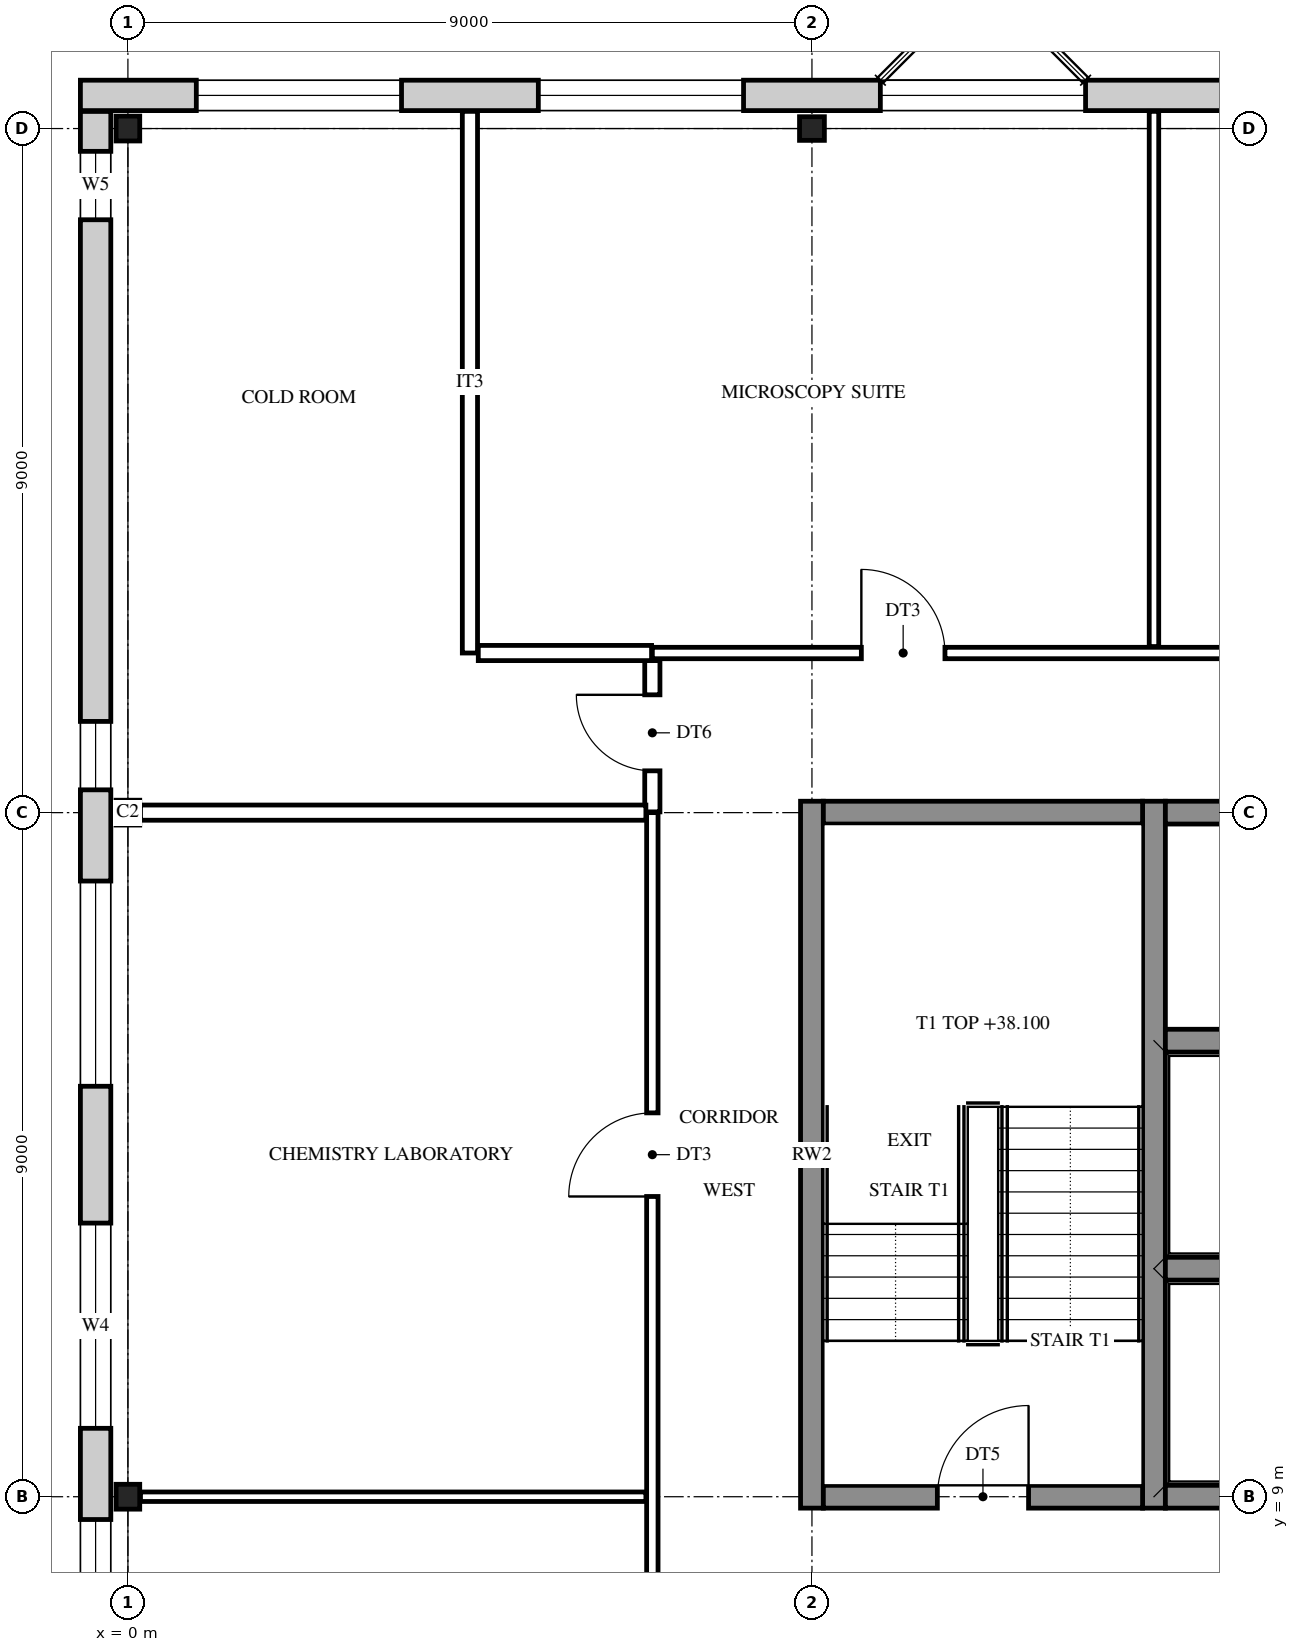
"""IFC4 building model, lengths in metres.
Left out: names, types, materials, properties, quantities, classifications, styles, units other than length and angle.
Written with IfcOpenShell. Run it as: python <this file> out.ifc"""

import sys

from ifc_helpers import new_model, si_unit, direction, frame, frame_2d, origin, origin_2d, place, context, subcontext, project, spatial, rectangle, i_section, extrude, element, fill, save


model = new_model("IFC4")
c1 = context("Model", 3, precision=1e-05, world=origin(), true_north=direction((0.0, 1.0)))
c2 = subcontext(c1, "Body", "Model", "MODEL_VIEW")
j1 = project(units=[si_unit("LENGTHUNIT", "METRE"), si_unit("PLANEANGLEUNIT", "RADIAN")], contexts=[c1])
p1 = place(None, origin())
s1 = spatial("IfcSite", under=j1, at=p1, CompositionType="ELEMENT")
p2 = place(p1, origin())
s2 = spatial("IfcBuilding", under=s1, at=p2, CompositionType="ELEMENT")
p3 = place(p2, frame((0.0, 0.0, 36.0)))
s3 = spatial("IfcBuildingStorey", under=s2, at=p3, CompositionType="ELEMENT", Elevation=36.0)
for number, where, z_axis, x_axis in (
    (1, (0.0, 9.0, 0.0), (0.0, 0.0, 1.0), (1.0, 0.0, 0.0)),
    (2, (0.0, 18.0, 0.0), (0.0, 0.0, 1.0), (1.0, 0.0, 0.0)),
    (3, (0.0, 27.0, 0.0), (0.0, 0.0, 1.0), (1.0, 0.0, 0.0)),
    (4, (9.0, 27.0, 0.0), (0.0, 0.0, 1.0), (0.0, 1.0, 0.0)),
):
    element("IfcColumn", number, at=place(p3, frame(where, z_axis=z_axis, x_axis=x_axis)), inside=s3, PredefinedType="COLUMN", context=c2, shape_type="SweptSolid", body=[
        extrude(i_section(OverallWidth=0.311, OverallDepth=0.327, WebThickness=0.016, FlangeThickness=0.025, FilletRadius=0.017, at=origin_2d()), origin(), (0.0, 0.0, 1.0), 4.2),
    ])
for number, where, z_axis, x_axis in (
    (5, (9.0, 8.85, 0.0), (0.0, 0.0, 1.0), (0.0, 1.0, 0.0)),
    (6, (13.5, 8.85, 0.0), (0.0, 0.0, 1.0), (0.0, 1.0, 0.0)),
):
    element("IfcWall", number, at=place(p3, frame(where, z_axis=z_axis, x_axis=x_axis)), inside=s3, PredefinedType="SHEAR", context=c2, shape_type="SweptSolid", body=[
        extrude(rectangle(XDim=9.3, YDim=0.3, at=frame_2d((4.65, 0.0))), origin(), (0.0, 0.0, 1.0), 4.2),
    ])
p4 = place(p3, frame((9.15, 9.0, 0.0), z_axis=(0.0, 0.0, 1.0), x_axis=(1.0, 0.0, 0.0)))
e7 = element("IfcWall", 7, at=p4, inside=s3, PredefinedType="SHEAR", context=c2, shape_type="SweptSolid", body=[
    extrude(rectangle(XDim=4.2, YDim=0.3, at=frame_2d((2.1, 0.0))), origin(), (0.0, 0.0, 1.0), 4.2),
])
p5 = place(p4, frame((1.5, 0.0, 0.0)))
e8 = element("IfcOpeningElement", 8, at=p5, cuts=e7, PredefinedType="OPENING", context=c2, shape_type="SweptSolid", body=[
    extrude(rectangle(XDim=1.2, YDim=2.1, at=frame_2d((0.6, 1.05))), frame((0.0, 0.16, 0.0), z_axis=(0.0, -1.0, 0.0), x_axis=(1.0, 0.0, 0.0)), (0.0, 0.0, 1.0), 0.32),
])
for number, where, z_axis, x_axis in (
    (9, (13.65, 9.0, 0.0), (0.0, 0.0, 1.0), (1.0, 0.0, 0.0)),
    (10, (13.65, 12.0, 0.0), (0.0, 0.0, 1.0), (1.0, 0.0, 0.0)),
    (11, (13.65, 15.0, 0.0), (0.0, 0.0, 1.0), (1.0, 0.0, 0.0)),
):
    element("IfcWall", number, at=place(p3, frame(where, z_axis=z_axis, x_axis=x_axis)), inside=s3, PredefinedType="SHEAR", context=c2, shape_type="SweptSolid", body=[
        extrude(rectangle(XDim=2.7, YDim=0.3, at=frame_2d((1.35, 0.0))), origin(), (0.0, 0.0, 1.0), 4.2),
    ])
p6 = place(p3, frame((9.15, 18.0, 0.0), z_axis=(0.0, 0.0, 1.0), x_axis=(1.0, 0.0, 0.0)))
e12 = element("IfcWall", 12, at=p6, inside=s3, PredefinedType="SHEAR", context=c2, shape_type="SweptSolid", body=[
    extrude(rectangle(XDim=4.2, YDim=0.3, at=frame_2d((2.1, 0.0))), origin(), (0.0, 0.0, 1.0), 4.2),
])
p7 = place(p3, frame((13.65, 18.0, 0.0), z_axis=(0.0, 0.0, 1.0), x_axis=(1.0, 0.0, 0.0)))
e13 = element("IfcWall", 13, at=p7, inside=s3, PredefinedType="SHEAR", context=c2, shape_type="SweptSolid", body=[
    extrude(rectangle(XDim=2.7, YDim=0.3, at=frame_2d((1.35, 0.0))), origin(), (0.0, 0.0, 1.0), 4.2),
])
p8 = place(p3, frame((-0.425, -0.225, 0.0), z_axis=(0.0, 0.0, 1.0), x_axis=(0.0, 1.0, 0.0)))
e14 = element("IfcWall", 14, at=p8, inside=s3, PredefinedType="STANDARD", context=c2, shape_type="SweptSolid", body=[
    extrude(rectangle(XDim=27.45, YDim=0.4, at=frame_2d((13.725, 0.0))), origin(), (0.0, 0.0, 1.0), 4.2),
])
p9 = place(p8, frame((0.525, 0.0, 0.9)))
e15 = element("IfcOpeningElement", 15, at=p9, cuts=e14, PredefinedType="OPENING", context=c2, shape_type="SweptSolid", body=[
    extrude(rectangle(XDim=0.9, YDim=2.0, at=frame_2d((0.45, 1.0))), frame((0.0, 0.21, 0.0), z_axis=(0.0, -1.0, 0.0), x_axis=(1.0, 0.0, 0.0)), (0.0, 0.0, 1.0), 0.42),
])
p10 = place(p8, frame((8.025, 0.0, 0.9)))
e16 = element("IfcOpeningElement", 16, at=p10, cuts=e14, PredefinedType="OPENING", context=c2, shape_type="SweptSolid", body=[
    extrude(rectangle(XDim=0.9, YDim=2.0, at=frame_2d((0.45, 1.0))), frame((0.0, 0.21, 0.0), z_axis=(0.0, -1.0, 0.0), x_axis=(1.0, 0.0, 0.0)), (0.0, 0.0, 1.0), 0.42),
])
p11 = place(p8, frame((10.125, 0.0, 0.9)))
e17 = element("IfcOpeningElement", 17, at=p11, cuts=e14, PredefinedType="OPENING", context=c2, shape_type="SweptSolid", body=[
    extrude(rectangle(XDim=2.7, YDim=2.5, at=frame_2d((1.35, 1.25))), frame((0.0, 0.21, 0.0), z_axis=(0.0, -1.0, 0.0), x_axis=(1.0, 0.0, 0.0)), (0.0, 0.0, 1.0), 0.42),
])
p12 = place(p8, frame((14.625, 0.0, 0.9)))
e18 = element("IfcOpeningElement", 18, at=p12, cuts=e14, PredefinedType="OPENING", context=c2, shape_type="SweptSolid", body=[
    extrude(rectangle(XDim=2.7, YDim=2.5, at=frame_2d((1.35, 1.25))), frame((0.0, 0.21, 0.0), z_axis=(0.0, -1.0, 0.0), x_axis=(1.0, 0.0, 0.0)), (0.0, 0.0, 1.0), 0.42),
])
p13 = place(p8, frame((18.525, 0.0, 0.9)))
e19 = element("IfcOpeningElement", 19, at=p13, cuts=e14, PredefinedType="OPENING", context=c2, shape_type="SweptSolid", body=[
    extrude(rectangle(XDim=0.9, YDim=2.0, at=frame_2d((0.45, 1.0))), frame((0.0, 0.21, 0.0), z_axis=(0.0, -1.0, 0.0), x_axis=(1.0, 0.0, 0.0)), (0.0, 0.0, 1.0), 0.42),
])
p14 = place(p8, frame((26.025, 0.0, 0.9)))
e20 = element("IfcOpeningElement", 20, at=p14, cuts=e14, PredefinedType="OPENING", context=c2, shape_type="SweptSolid", body=[
    extrude(rectangle(XDim=0.9, YDim=2.0, at=frame_2d((0.45, 1.0))), frame((0.0, 0.21, 0.0), z_axis=(0.0, -1.0, 0.0), x_axis=(1.0, 0.0, 0.0)), (0.0, 0.0, 1.0), 0.42),
])
p15 = place(p3, frame((-0.625, 27.436, 0.0), z_axis=(0.0, 0.0, 1.0), x_axis=(1.0, 0.0, 0.0)))
e21 = element("IfcWall", 21, at=p15, inside=s3, PredefinedType="STANDARD", context=c2, shape_type="SweptSolid", body=[
    extrude(rectangle(XDim=32.75, YDim=0.4, at=frame_2d((16.375, 0.0))), origin(), (0.0, 0.0, 1.0), 4.2),
])
p16 = place(p15, frame((1.525, 0.0, 0.9)))
e22 = element("IfcOpeningElement", 22, at=p16, cuts=e21, PredefinedType="OPENING", context=c2, shape_type="SweptSolid", body=[
    extrude(rectangle(XDim=2.7, YDim=2.5, at=frame_2d((1.35, 1.25))), frame((0.0, 0.21, 0.0), z_axis=(0.0, -1.0, 0.0), x_axis=(1.0, 0.0, 0.0)), (0.0, 0.0, 1.0), 0.42),
])
p17 = place(p15, frame((6.025, 0.0, 0.9)))
e23 = element("IfcOpeningElement", 23, at=p17, cuts=e21, PredefinedType="OPENING", context=c2, shape_type="SweptSolid", body=[
    extrude(rectangle(XDim=2.7, YDim=2.5, at=frame_2d((1.35, 1.25))), frame((0.0, 0.21, 0.0), z_axis=(0.0, -1.0, 0.0), x_axis=(1.0, 0.0, 0.0)), (0.0, 0.0, 1.0), 0.42),
])
p18 = place(p15, frame((10.525, 0.0, 0.9)))
e24 = element("IfcOpeningElement", 24, at=p18, cuts=e21, PredefinedType="OPENING", context=c2, shape_type="SweptSolid", body=[
    extrude(rectangle(XDim=2.7, YDim=2.5, at=frame_2d((1.35, 1.25))), frame((0.0, 0.21, 0.0), z_axis=(0.0, -1.0, 0.0), x_axis=(1.0, 0.0, 0.0)), (0.0, 0.0, 1.0), 0.42),
])
p19 = place(p15, frame((15.025, 0.0, 0.9)))
e25 = element("IfcOpeningElement", 25, at=p19, cuts=e21, PredefinedType="OPENING", context=c2, shape_type="SweptSolid", body=[
    extrude(rectangle(XDim=2.7, YDim=2.5, at=frame_2d((1.35, 1.25))), frame((0.0, 0.21, 0.0), z_axis=(0.0, -1.0, 0.0), x_axis=(1.0, 0.0, 0.0)), (0.0, 0.0, 1.0), 0.42),
])
p20 = place(p15, frame((19.525, 0.0, 0.9)))
e26 = element("IfcOpeningElement", 26, at=p20, cuts=e21, PredefinedType="OPENING", context=c2, shape_type="SweptSolid", body=[
    extrude(rectangle(XDim=2.7, YDim=2.5, at=frame_2d((1.35, 1.25))), frame((0.0, 0.21, 0.0), z_axis=(0.0, -1.0, 0.0), x_axis=(1.0, 0.0, 0.0)), (0.0, 0.0, 1.0), 0.42),
])
p21 = place(p15, frame((24.025, 0.0, 0.9)))
e27 = element("IfcOpeningElement", 27, at=p21, cuts=e21, PredefinedType="OPENING", context=c2, shape_type="SweptSolid", body=[
    extrude(rectangle(XDim=2.7, YDim=2.5, at=frame_2d((1.35, 1.25))), frame((0.0, 0.21, 0.0), z_axis=(0.0, -1.0, 0.0), x_axis=(1.0, 0.0, 0.0)), (0.0, 0.0, 1.0), 0.42),
])
p22 = place(p15, frame((28.525, 0.0, 0.9)))
e28 = element("IfcOpeningElement", 28, at=p22, cuts=e21, PredefinedType="OPENING", context=c2, shape_type="SweptSolid", body=[
    extrude(rectangle(XDim=2.7, YDim=2.5, at=frame_2d((1.35, 1.25))), frame((0.0, 0.21, 0.0), z_axis=(0.0, -1.0, 0.0), x_axis=(1.0, 0.0, 0.0)), (0.0, 0.0, 1.0), 0.42),
])
p23 = place(p3, frame((4.5, 20.1, 0.0), z_axis=(0.0, 0.0, 1.0), x_axis=(0.0, 1.0, 0.0)))
e29 = element("IfcWall", 29, at=p23, inside=s3, PredefinedType="PARTITIONING", context=c2, shape_type="SweptSolid", body=[
    extrude(rectangle(XDim=7.126, YDim=0.2, at=frame_2d((3.563, 0.0))), origin(), (0.0, 0.0, 1.0), 3.537),
])
p24 = place(p3, frame((6.9, 6.985, 0.0), z_axis=(0.0, 0.0, 1.0), x_axis=(0.0, 1.0, 0.0)))
e30 = element("IfcWall", 30, at=p24, inside=s3, PredefinedType="PARTITIONING", context=c2, shape_type="SweptSolid", body=[
    extrude(rectangle(XDim=11.015, YDim=0.15, at=frame_2d((5.507, 0.0))), origin(), (0.0, 0.0, 1.0), 3.537),
])
p25 = place(p24, frame((5.965, 0.0, 0.0)))
e31 = element("IfcOpeningElement", 31, at=p25, cuts=e30, PredefinedType="OPENING", context=c2, shape_type="SweptSolid", body=[
    extrude(rectangle(XDim=1.1, YDim=2.1, at=frame_2d((0.55, 1.05))), frame((0.0, 0.085, 0.0), z_axis=(0.0, -1.0, 0.0), x_axis=(1.0, 0.0, 0.0)), (0.0, 0.0, 1.0), 0.17),
])
p26 = place(p3, frame((6.9, 18.01, 0.0), z_axis=(0.0, 0.0, 1.0), x_axis=(0.0, 1.0, 0.0)))
e32 = element("IfcWall", 32, at=p26, inside=s3, PredefinedType="PARTITIONING", context=c2, shape_type="SweptSolid", body=[
    extrude(rectangle(XDim=1.99, YDim=0.2, at=frame_2d((0.995, 0.0))), origin(), (0.0, 0.0, 1.0), 3.537),
])
p27 = place(p26, frame((0.54, 0.0, 0.0)))
e33 = element("IfcOpeningElement", 33, at=p27, cuts=e32, PredefinedType="OPENING", context=c2, shape_type="SweptSolid", body=[
    extrude(rectangle(XDim=1.0, YDim=2.1, at=frame_2d((0.5, 1.05))), frame((0.0, 0.11, 0.0), z_axis=(0.0, -1.0, 0.0), x_axis=(1.0, 0.0, 0.0)), (0.0, 0.0, 1.0), 0.22),
])
p28 = place(p3, frame((13.5, 20.185, 0.0), z_axis=(0.0, 0.0, 1.0), x_axis=(0.0, 1.0, 0.0)))
e34 = element("IfcWall", 34, at=p28, inside=s3, PredefinedType="PARTITIONING", context=c2, shape_type="SweptSolid", body=[
    extrude(rectangle(XDim=7.041, YDim=0.125, at=frame_2d((3.521, 0.0))), origin(), (0.0, 0.0, 1.0), 3.537),
])
p29 = place(p3, frame((0.166, 9.0, 0.0), z_axis=(0.0, 0.0, 1.0), x_axis=(1.0, 0.0, 0.0)))
e35 = element("IfcWall", 35, at=p29, inside=s3, PredefinedType="PARTITIONING", context=c2, shape_type="SweptSolid", body=[
    extrude(rectangle(XDim=6.649, YDim=0.125, at=frame_2d((3.325, 0.0))), origin(), (0.0, 0.0, 1.0), 3.537),
])
p30 = place(p3, frame((0.166, 18.0, 0.0), z_axis=(0.0, 0.0, 1.0), x_axis=(1.0, 0.0, 0.0)))
e36 = element("IfcWall", 36, at=p30, inside=s3, PredefinedType="PARTITIONING", context=c2, shape_type="SweptSolid", body=[
    extrude(rectangle(XDim=6.649, YDim=0.2, at=frame_2d((3.325, 0.0))), origin(), (0.0, 0.0, 1.0), 3.537),
])
p31 = place(p3, frame((4.61, 20.1, 0.0), z_axis=(0.0, 0.0, 1.0), x_axis=(1.0, 0.0, 0.0)))
e37 = element("IfcWall", 37, at=p31, inside=s3, PredefinedType="PARTITIONING", context=c2, shape_type="SweptSolid", body=[
    extrude(rectangle(XDim=2.28, YDim=0.2, at=frame_2d((1.14, 0.0))), origin(), (0.0, 0.0, 1.0), 3.537),
])
p32 = place(p3, frame((6.9, 20.1, 0.0), z_axis=(0.0, 0.0, 1.0), x_axis=(1.0, 0.0, 0.0)))
e38 = element("IfcWall", 38, at=p32, inside=s3, PredefinedType="PARTITIONING", context=c2, shape_type="SweptSolid", body=[
    extrude(rectangle(XDim=15.6, YDim=0.15, at=frame_2d((7.8, 0.0))), origin(), (0.0, 0.0, 1.0), 3.537),
])
p33 = place(p32, frame((2.75, 0.0, 0.0)))
e39 = element("IfcOpeningElement", 39, at=p33, cuts=e38, PredefinedType="OPENING", context=c2, shape_type="SweptSolid", body=[
    extrude(rectangle(XDim=1.1, YDim=2.1, at=frame_2d((0.55, 1.05))), frame((0.0, 0.085, 0.0), z_axis=(0.0, -1.0, 0.0), x_axis=(1.0, 0.0, 0.0)), (0.0, 0.0, 1.0), 0.17),
])
p34 = place(p32, frame((8.35, 0.0, 0.0)))
e40 = element("IfcOpeningElement", 40, at=p34, cuts=e38, PredefinedType="OPENING", context=c2, shape_type="SweptSolid", body=[
    extrude(rectangle(XDim=1.0, YDim=2.1, at=frame_2d((0.5, 1.05))), frame((0.0, 0.085, 0.0), z_axis=(0.0, -1.0, 0.0), x_axis=(1.0, 0.0, 0.0)), (0.0, 0.0, 1.0), 0.17),
])
p35 = place(p32, frame((12.85, 0.0, 0.0)))
e41 = element("IfcOpeningElement", 41, at=p35, cuts=e38, PredefinedType="OPENING", context=c2, shape_type="SweptSolid", body=[
    extrude(rectangle(XDim=1.0, YDim=2.1, at=frame_2d((0.5, 1.05))), frame((0.0, 0.085, 0.0), z_axis=(0.0, -1.0, 0.0), x_axis=(1.0, 0.0, 0.0)), (0.0, 0.0, 1.0), 0.17),
])
p36 = place(p10, origin())
e42 = element("IfcWindow", 42, at=p36, inside=s3, PartitioningType="SINGLE_PANEL", PredefinedType="WINDOW", context=c2, shape_type="SweptSolid", body=[
    extrude(rectangle(XDim=0.9, YDim=2.0, at=frame_2d((0.45, 1.0))), frame((0.0, 0.03, 0.0), z_axis=(0.0, -1.0, 0.0), x_axis=(1.0, 0.0, 0.0)), (0.0, 0.0, 1.0), 0.06),
])
fill(e16, e42)
p37 = place(p11, origin())
e43 = element("IfcWindow", 43, at=p37, inside=s3, PartitioningType="SINGLE_PANEL", PredefinedType="WINDOW", context=c2, shape_type="SweptSolid", body=[
    extrude(rectangle(XDim=2.7, YDim=2.5, at=frame_2d((1.35, 1.25))), frame((0.0, 0.03, 0.0), z_axis=(0.0, -1.0, 0.0), x_axis=(1.0, 0.0, 0.0)), (0.0, 0.0, 1.0), 0.06),
])
fill(e17, e43)
p38 = place(p12, origin())
e44 = element("IfcWindow", 44, at=p38, inside=s3, PartitioningType="SINGLE_PANEL", PredefinedType="WINDOW", context=c2, shape_type="SweptSolid", body=[
    extrude(rectangle(XDim=2.7, YDim=2.5, at=frame_2d((1.35, 1.25))), frame((0.0, 0.03, 0.0), z_axis=(0.0, -1.0, 0.0), x_axis=(1.0, 0.0, 0.0)), (0.0, 0.0, 1.0), 0.06),
])
fill(e18, e44)
p39 = place(p13, origin())
e45 = element("IfcWindow", 45, at=p39, inside=s3, PartitioningType="SINGLE_PANEL", PredefinedType="WINDOW", context=c2, shape_type="SweptSolid", body=[
    extrude(rectangle(XDim=0.9, YDim=2.0, at=frame_2d((0.45, 1.0))), frame((0.0, 0.03, 0.0), z_axis=(0.0, -1.0, 0.0), x_axis=(1.0, 0.0, 0.0)), (0.0, 0.0, 1.0), 0.06),
])
fill(e19, e45)
p40 = place(p14, origin())
e46 = element("IfcWindow", 46, at=p40, inside=s3, PartitioningType="SINGLE_PANEL", PredefinedType="WINDOW", context=c2, shape_type="SweptSolid", body=[
    extrude(rectangle(XDim=0.9, YDim=2.0, at=frame_2d((0.45, 1.0))), frame((0.0, 0.03, 0.0), z_axis=(0.0, -1.0, 0.0), x_axis=(1.0, 0.0, 0.0)), (0.0, 0.0, 1.0), 0.06),
])
fill(e20, e46)
p41 = place(p16, origin())
e47 = element("IfcWindow", 47, at=p41, inside=s3, PartitioningType="SINGLE_PANEL", PredefinedType="WINDOW", context=c2, shape_type="SweptSolid", body=[
    extrude(rectangle(XDim=2.7, YDim=2.5, at=frame_2d((1.35, 1.25))), frame((0.0, 0.03, 0.0), z_axis=(0.0, -1.0, 0.0), x_axis=(1.0, 0.0, 0.0)), (0.0, 0.0, 1.0), 0.06),
])
fill(e22, e47)
p42 = place(p17, origin())
e48 = element("IfcWindow", 48, at=p42, inside=s3, PartitioningType="SINGLE_PANEL", PredefinedType="WINDOW", context=c2, shape_type="SweptSolid", body=[
    extrude(rectangle(XDim=2.7, YDim=2.5, at=frame_2d((1.35, 1.25))), frame((0.0, 0.03, 0.0), z_axis=(0.0, -1.0, 0.0), x_axis=(1.0, 0.0, 0.0)), (0.0, 0.0, 1.0), 0.06),
])
fill(e23, e48)
p43 = place(p18, origin())
e49 = element("IfcWindow", 49, at=p43, inside=s3, PartitioningType="SINGLE_PANEL", PredefinedType="WINDOW", context=c2, shape_type="SweptSolid", body=[
    extrude(rectangle(XDim=2.7, YDim=2.5, at=frame_2d((1.35, 1.25))), frame((0.0, 0.03, 0.0), z_axis=(0.0, -1.0, 0.0), x_axis=(1.0, 0.0, 0.0)), (0.0, 0.0, 1.0), 0.06),
])
fill(e24, e49)
p44 = place(p5, origin())
e50 = element("IfcDoor", 50, at=p44, inside=s3, OperationType="SINGLE_SWING_RIGHT", PredefinedType="DOOR", context=c2, shape_type="SweptSolid", body=[
    extrude(rectangle(XDim=1.2, YDim=2.1, at=frame_2d((0.6, 1.05))), frame((0.0, 0.025, 0.0), z_axis=(0.0, -1.0, 0.0), x_axis=(1.0, 0.0, 0.0)), (0.0, 0.0, 1.0), 0.05),
])
fill(e8, e50)
p45 = place(p27, origin())
e51 = element("IfcDoor", 51, at=p45, inside=s3, OperationType="SINGLE_SWING_RIGHT", PredefinedType="DOOR", context=c2, shape_type="SweptSolid", body=[
    extrude(rectangle(XDim=1.0, YDim=2.1, at=frame_2d((0.5, 1.05))), frame((0.0, 0.025, 0.0), z_axis=(0.0, -1.0, 0.0), x_axis=(1.0, 0.0, 0.0)), (0.0, 0.0, 1.0), 0.05),
])
fill(e33, e51)
p46 = place(p33, origin())
e52 = element("IfcDoor", 52, at=p46, inside=s3, OperationType="SINGLE_SWING_LEFT", PredefinedType="DOOR", context=c2, shape_type="SweptSolid", body=[
    extrude(rectangle(XDim=1.1, YDim=2.1, at=frame_2d((0.55, 1.05))), frame((0.0, 0.025, 0.0), z_axis=(0.0, -1.0, 0.0), x_axis=(1.0, 0.0, 0.0)), (0.0, 0.0, 1.0), 0.05),
])
fill(e39, e52)
p47 = place(p25, origin())
e53 = element("IfcDoor", 53, at=p47, inside=s3, OperationType="SINGLE_SWING_LEFT", PredefinedType="DOOR", context=c2, shape_type="SweptSolid", body=[
    extrude(rectangle(XDim=1.1, YDim=2.1, at=frame_2d((0.55, 1.05))), frame((0.0, 0.025, 0.0), z_axis=(0.0, -1.0, 0.0), x_axis=(1.0, 0.0, 0.0)), (0.0, 0.0, 1.0), 0.05),
])
fill(e31, e53)
save(model, sys.argv[1])
